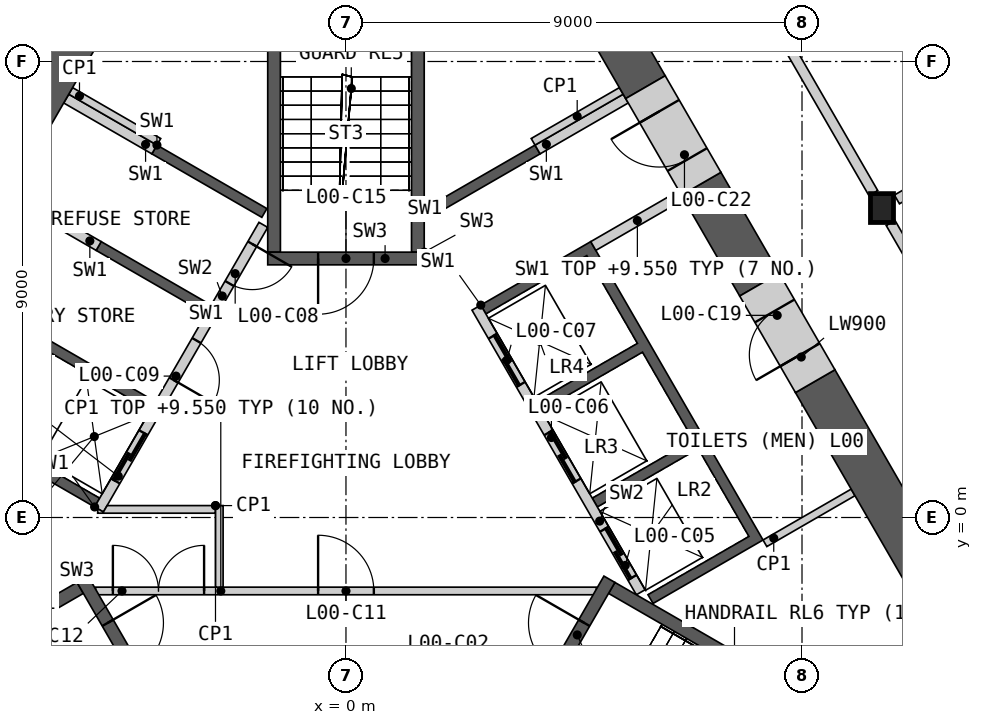
"""IFC4 building model, lengths in metres.
Left out: names, types, materials, properties, quantities, classifications, styles, units other than length and angle.
Written with IfcOpenShell. Run it as: python <this file> out.ifc"""

import sys

from ifc_helpers import new_model, si_unit, direction, frame, frame_2d, origin, origin_2d, place, context, subcontext, project, spatial, polyline, rectangle, i_section, outline, extrude, element, fill, save


model = new_model("IFC4")
c1 = context("Model", 3, precision=1e-05, world=origin(), true_north=direction((0.0, 1.0)))
c2 = subcontext(c1, "Body", "Model", "MODEL_VIEW")
j1 = project(units=[si_unit("LENGTHUNIT", "METRE"), si_unit("PLANEANGLEUNIT", "RADIAN")], contexts=[c1])
p1 = place(None, origin())
s1 = spatial("IfcSite", under=j1, at=p1, CompositionType="ELEMENT")
p2 = place(p1, origin())
s2 = spatial("IfcBuilding", under=s1, at=p2, CompositionType="ELEMENT")
p3 = place(p2, origin())
s3 = spatial("IfcBuildingStorey", under=s2, at=p3, CompositionType="ELEMENT", Elevation=0.0)
p4 = place(p3, frame((10.578, 6.107, 0.0), z_axis=(0.0, 0.0, 1.0), x_axis=(1.0, 0.0, 0.0)))
e1 = element("IfcColumn", 1, at=p4, inside=s3, PredefinedType="COLUMN", context=c2, shape_type="SweptSolid", body=[
    extrude(i_section(OverallWidth=0.454, OverallDepth=0.57, WebThickness=0.078, FlangeThickness=0.125, at=origin_2d()), origin(), (0.0, 0.0, 1.0), 10.0),
])
p5 = place(p3, origin())
e2 = element("IfcWall", 2, at=p5, inside=s3, PredefinedType="SHEAR", context=c2, shape_type="SweptSolid", body=[
    extrude(outline(polyline([(1.561, 6.097), (3.731, 7.35), (3.831, 7.177), (1.66, 5.924), (1.561, 6.097)])), origin(), (0.0, 0.0, 1.0), 9.55),
])
p6 = place(p3, origin())
e3 = element("IfcWall", 3, at=p6, inside=s3, PredefinedType="SHEAR", context=c2, shape_type="SweptSolid", body=[
    extrude(outline(polyline([(2.66, 4.192), (4.831, 5.445), (8.231, -0.444), (6.061, -1.697), (5.96, -1.524), (7.952, -0.374), (6.952, 1.358), (4.96, 0.208), (4.861, 0.381), (6.852, 1.531), (5.852, 3.263), (3.861, 2.113), (3.76, 2.287), (5.752, 3.437), (4.752, 5.169), (2.76, 4.019), (2.66, 4.192)])), origin(), (0.0, 0.0, 1.0), 9.55),
])
p7 = place(p3, frame((5.817, -1.476, 0.0), z_axis=(0.0, 0.0, 1.0), x_axis=(-0.499992876559, 0.866029516466, 0.0)))
e4 = element("IfcWall", 4, at=p7, inside=s3, PredefinedType="SOLIDWALL", context=c2, shape_type="SweptSolid", body=[
    extrude(rectangle(XDim=6.486, YDim=0.2, at=frame_2d((3.243, 0.0))), origin(), (0.0, 0.0, 1.0), 9.55),
])
p8 = place(p7, frame((0.337, 0.0, 0.0)))
e5 = element("IfcOpeningElement", 5, at=p8, cuts=e4, PredefinedType="OPENING", context=c2, shape_type="SweptSolid", body=[
    extrude(rectangle(XDim=1.1, YDim=2.1, at=frame_2d((0.55, 1.05))), frame((0.0, 0.11, 0.0), z_axis=(0.0, -1.0, 0.0), x_axis=(1.0, 0.0, 0.0)), (0.0, 0.0, 1.0), 0.22),
])
p9 = place(p7, frame((2.537, 0.0, 0.0)))
e6 = element("IfcOpeningElement", 6, at=p9, cuts=e4, PredefinedType="OPENING", context=c2, shape_type="SweptSolid", body=[
    extrude(rectangle(XDim=1.1, YDim=2.1, at=frame_2d((0.55, 1.05))), frame((0.0, 0.11, 0.0), z_axis=(0.0, -1.0, 0.0), x_axis=(1.0, 0.0, 0.0)), (0.0, 0.0, 1.0), 0.22),
])
p10 = place(p7, frame((4.737, 0.0, 0.0)))
e7 = element("IfcOpeningElement", 7, at=p10, cuts=e4, PredefinedType="OPENING", context=c2, shape_type="SweptSolid", body=[
    extrude(rectangle(XDim=1.1, YDim=2.1, at=frame_2d((0.55, 1.05))), frame((0.0, 0.11, 0.0), z_axis=(0.0, -1.0, 0.0), x_axis=(1.0, 0.0, 0.0)), (0.0, 0.0, 1.0), 0.22),
])
p11 = place(p3, frame((4.881, 5.358, 0.0), z_axis=(0.0, 0.0, 1.0), x_axis=(0.866035824272, 0.499981950752, 0.0)))
e8 = element("IfcWall", 8, at=p11, inside=s3, PredefinedType="SHEAR", context=c2, shape_type="SweptSolid", body=[
    extrude(rectangle(XDim=2.009, YDim=0.2, at=frame_2d((1.004, 0.0))), origin(), (0.0, 0.0, 1.0), 9.55),
])
p12 = place(p3, frame((3.781, 7.263, 0.0), z_axis=(0.0, 0.0, 1.0), x_axis=(0.865983199114, 0.50007309351, 0.0)))
e9 = element("IfcWall", 9, at=p12, inside=s3, PredefinedType="SHEAR", context=c2, shape_type="SweptSolid", body=[
    extrude(rectangle(XDim=2.009, YDim=0.2, at=frame_2d((1.004, 0.0))), origin(), (0.0, 0.0, 1.0), 9.55),
])
p13 = place(p3, origin())
e10 = element("IfcWall", 10, at=p13, inside=s3, PredefinedType="SHEAR", context=c2, shape_type="SweptSolid", body=[
    extrude(outline(polyline([(-4.96, 0.208), (-7.131, 1.461), (-5.931, 3.54), (-3.76, 2.287), (-3.861, 2.113), (-5.852, 3.263), (-6.852, 1.531), (-4.861, 0.381), (-4.96, 0.208)])), origin(), (0.0, 0.0, 1.0), 9.55),
])
p14 = place(p3, origin())
e11 = element("IfcWall", 11, at=p14, inside=s3, PredefinedType="SHEAR", context=c2, shape_type="SweptSolid", body=[
    extrude(outline(polyline([(-2.76, 4.019), (-4.931, 5.272), (-4.831, 5.445), (-2.66, 4.192), (-2.76, 4.019)])), origin(), (0.0, 0.0, 1.0), 9.55),
])
p15 = place(p3, origin())
e12 = element("IfcWall", 12, at=p15, inside=s3, PredefinedType="SHEAR", context=c2, shape_type="SweptSolid", body=[
    extrude(outline(polyline([(-3.731, 7.35), (-1.561, 6.097), (-1.66, 5.924), (-3.831, 7.177), (-3.731, 7.35)])), origin(), (0.0, 0.0, 1.0), 9.55),
])
p16 = place(p3, frame((-1.631, 5.776, 0.0), z_axis=(0.0, 0.0, 1.0), x_axis=(-0.499992876559, -0.866029516466, 0.0)))
e13 = element("IfcWall", 13, at=p16, inside=s3, PredefinedType="SOLIDWALL", context=c2, shape_type="SweptSolid", body=[
    extrude(rectangle(XDim=6.486, YDim=0.2, at=frame_2d((3.243, 0.0))), origin(), (0.0, 0.0, 1.0), 9.55),
])
p17 = place(p16, frame((0.437, 0.0, 0.0)))
e14 = element("IfcOpeningElement", 14, at=p17, cuts=e13, PredefinedType="OPENING", context=c2, shape_type="SweptSolid", body=[
    extrude(rectangle(XDim=0.9, YDim=2.1, at=frame_2d((0.45, 1.05))), frame((0.0, 0.11, 0.0), z_axis=(0.0, -1.0, 0.0), x_axis=(1.0, 0.0, 0.0)), (0.0, 0.0, 1.0), 0.22),
])
p18 = place(p16, frame((2.637, 0.0, 0.0)))
e15 = element("IfcOpeningElement", 15, at=p18, cuts=e13, PredefinedType="OPENING", context=c2, shape_type="SweptSolid", body=[
    extrude(rectangle(XDim=0.9, YDim=2.1, at=frame_2d((0.45, 1.05))), frame((0.0, 0.11, 0.0), z_axis=(0.0, -1.0, 0.0), x_axis=(1.0, 0.0, 0.0)), (0.0, 0.0, 1.0), 0.22),
])
p19 = place(p16, frame((4.737, 0.0, 0.0)))
e16 = element("IfcOpeningElement", 16, at=p19, cuts=e13, PredefinedType="OPENING", context=c2, shape_type="SweptSolid", body=[
    extrude(rectangle(XDim=1.1, YDim=2.1, at=frame_2d((0.55, 1.05))), frame((0.0, 0.11, 0.0), z_axis=(0.0, -1.0, 0.0), x_axis=(1.0, 0.0, 0.0)), (0.0, 0.0, 1.0), 0.22),
])
p20 = place(p3, frame((-3.781, 7.263, 0.0), z_axis=(0.0, 0.0, 1.0), x_axis=(-0.865983199114, 0.50007309351, 0.0)))
e17 = element("IfcWall", 17, at=p20, inside=s3, PredefinedType="SHEAR", context=c2, shape_type="SweptSolid", body=[
    extrude(rectangle(XDim=2.009, YDim=0.2, at=frame_2d((1.004, 0.0))), origin(), (0.0, 0.0, 1.0), 9.55),
])
p21 = place(p3, frame((-4.881, 5.358, 0.0), z_axis=(0.0, 0.0, 1.0), x_axis=(-0.866035824272, 0.499981950752, 0.0)))
e18 = element("IfcWall", 18, at=p21, inside=s3, PredefinedType="SHEAR", context=c2, shape_type="SweptSolid", body=[
    extrude(rectangle(XDim=2.009, YDim=0.2, at=frame_2d((1.004, 0.0))), origin(), (0.0, 0.0, 1.0), 9.55),
])
p22 = place(p3, frame((-4.941, -1.45, 0.0), z_axis=(0.0, 0.0, 1.0), x_axis=(1.0, 0.0, 0.0)))
e19 = element("IfcWall", 19, at=p22, inside=s3, PredefinedType="PARTITIONING", context=c2, shape_type="SweptSolid", body=[
    extrude(rectangle(XDim=9.882, YDim=0.15, at=frame_2d((4.941, 0.0))), origin(), (0.0, 0.0, 1.0), 9.55),
])
p23 = place(p22, frame((4.391, 0.0, 0.0)))
e20 = element("IfcOpeningElement", 20, at=p23, cuts=e19, PredefinedType="OPENING", context=c2, shape_type="SweptSolid", body=[
    extrude(rectangle(XDim=1.1, YDim=2.1, at=frame_2d((0.55, 1.05))), frame((0.0, 0.085, 0.0), z_axis=(0.0, -1.0, 0.0), x_axis=(1.0, 0.0, 0.0)), (0.0, 0.0, 1.0), 0.17),
])
p24 = place(p22, frame((0.341, 0.0, 0.0)))
e21 = element("IfcOpeningElement", 21, at=p24, cuts=e19, PredefinedType="OPENING", context=c2, shape_type="SweptSolid", body=[
    extrude(rectangle(XDim=1.8, YDim=2.1, at=frame_2d((0.9, 1.05))), frame((0.0, 0.085, 0.0), z_axis=(0.0, -1.0, 0.0), x_axis=(1.0, 0.0, 0.0)), (0.0, 0.0, 1.0), 0.17),
])
p25 = place(p3, origin())
e22 = element("IfcWall", 22, at=p25, inside=s3, PredefinedType="PARTITIONING", context=c2, shape_type="SweptSolid", body=[
    extrude(outline(polyline([(-2.575, 0.235), (-2.575, 0.085), (-4.9, 0.085), (-4.9, 0.173), (-4.787, 0.108), (-4.714, 0.235), (-2.575, 0.235)])), origin(), (0.0, 0.0, 1.0), 9.55),
])
p26 = place(p3, origin())
e23 = element("IfcWall", 23, at=p26, inside=s3, PredefinedType="PARTITIONING", context=c2, shape_type="SweptSolid", body=[
    extrude(outline(polyline([(-2.575, 0.235), (-2.425, 0.235), (-2.425, -1.375), (-2.575, -1.375), (-2.575, 0.235)])), origin(), (0.0, 0.0, 1.0), 9.55),
])
p27 = place(p3, origin())
e24 = element("IfcWall", 24, at=p27, inside=s3, PredefinedType="SHEAR", context=c2, shape_type="SweptSolid", body=[
    extrude(outline(polyline([(-5.307, -1.281), (-10.374, -4.206), (-10.032, -4.298), (-5.182, -1.498), (-5.307, -1.281)])), origin(), (0.0, 0.0, 1.0), 9.55),
])
p28 = place(p3, frame((-5.199, -1.219, 0.0), z_axis=(0.0, 0.0, 1.0), x_axis=(0.499982516597, -0.866035497597, 0.0)))
e25 = element("IfcWall", 25, at=p28, inside=s3, PredefinedType="SHEAR", context=c2, shape_type="SweptSolid", body=[
    extrude(rectangle(XDim=3.088, YDim=0.25, at=frame_2d((1.544, 0.0))), origin(), (0.0, 0.0, 1.0), 9.55),
])
p29 = place(p28, frame((0.994, 0.0, 0.0)))
e26 = element("IfcOpeningElement", 26, at=p29, cuts=e25, PredefinedType="OPENING", context=c2, shape_type="SweptSolid", body=[
    extrude(rectangle(XDim=1.1, YDim=2.1, at=frame_2d((0.55, 1.05))), frame((0.0, 0.135, 0.0), z_axis=(0.0, -1.0, 0.0), x_axis=(1.0, 0.0, 0.0)), (0.0, 0.0, 1.0), 0.27),
])
p30 = place(p3, origin())
e27 = element("IfcWall", 27, at=p30, inside=s3, PredefinedType="SHEAR", context=c2, shape_type="SweptSolid", body=[
    extrude(outline(polyline([(10.032, -4.298), (10.374, -4.206), (5.307, -1.281), (5.182, -1.498), (10.032, -4.298)])), origin(), (0.0, 0.0, 1.0), 9.55),
])
p31 = place(p3, frame((3.655, -3.893, 0.0), z_axis=(0.0, 0.0, 1.0), x_axis=(0.499982516597, 0.866035497597, 0.0)))
e28 = element("IfcWall", 28, at=p31, inside=s3, PredefinedType="SHEAR", context=c2, shape_type="SweptSolid", body=[
    extrude(rectangle(XDim=3.088, YDim=0.25, at=frame_2d((1.544, 0.0))), origin(), (0.0, 0.0, 1.0), 9.55),
])
p32 = place(p31, frame((0.994, 0.0, 0.0)))
e29 = element("IfcOpeningElement", 29, at=p32, cuts=e28, PredefinedType="OPENING", context=c2, shape_type="SweptSolid", body=[
    extrude(rectangle(XDim=1.1, YDim=2.1, at=frame_2d((0.55, 1.05))), frame((0.0, 0.135, 0.0), z_axis=(0.0, -1.0, 0.0), x_axis=(1.0, 0.0, 0.0)), (0.0, 0.0, 1.0), 0.27),
])
p33 = place(p3, origin())
e30 = element("IfcWall", 30, at=p33, inside=s3, PredefinedType="SHEAR", context=c2, shape_type="SweptSolid", body=[
    extrude(outline(polyline([(1.544, 5.237), (1.544, 11.087), (1.294, 10.837), (1.294, 5.237), (1.544, 5.237)])), origin(), (0.0, 0.0, 1.0), 9.55),
])
p34 = place(p3, origin())
e31 = element("IfcWall", 31, at=p34, inside=s3, PredefinedType="SHEAR", context=c2, shape_type="SweptSolid", body=[
    extrude(outline(polyline([(-1.294, 10.837), (-1.544, 11.087), (-1.544, 5.237), (-1.294, 5.237), (-1.294, 10.837)])), origin(), (0.0, 0.0, 1.0), 9.55),
])
p35 = place(p3, frame((1.544, 5.112, 0.0), z_axis=(0.0, 0.0, 1.0), x_axis=(-1.0, 0.0, 0.0)))
e32 = element("IfcWall", 32, at=p35, inside=s3, PredefinedType="SHEAR", context=c2, shape_type="SweptSolid", body=[
    extrude(rectangle(XDim=3.088, YDim=0.25, at=frame_2d((1.544, 0.0))), origin(), (0.0, 0.0, 1.0), 9.55),
])
p36 = place(p35, frame((0.994, 0.0, 0.0)))
e33 = element("IfcOpeningElement", 33, at=p36, cuts=e32, PredefinedType="OPENING", context=c2, shape_type="SweptSolid", body=[
    extrude(rectangle(XDim=1.1, YDim=2.1, at=frame_2d((0.55, 1.05))), frame((0.0, 0.135, 0.0), z_axis=(0.0, -1.0, 0.0), x_axis=(1.0, 0.0, 0.0)), (0.0, 0.0, 1.0), 0.27),
])
for number, where, z_axis, x_axis in (
    (34, (3.693, 7.415, 0.0), (0.0, 0.0, 1.0), (0.866, 0.5, 0.0)),
    (35, (8.268, -0.509, 0.0), (0.0, 0.0, 1.0), (0.866, 0.5, 0.0)),
    (36, (-3.693, 7.415, 0.0), (0.0, 0.0, 1.0), (-0.866, 0.5, 0.0)),
):
    element("IfcWall", number, at=place(p3, frame(where, z_axis=z_axis, x_axis=x_axis)), inside=s3, PredefinedType="PARTITIONING", context=c2, shape_type="SweptSolid", body=[
        extrude(rectangle(XDim=2.009, YDim=0.15, at=frame_2d((1.004, 0.0))), origin(), (0.0, 0.0, 1.0), 9.55),
    ])
p37 = place(p3, frame((5.91, 8.493, 0.0), z_axis=(0.0, 0.0, 1.0), x_axis=(-0.50000828114, 0.866020622613, 0.0)))
e37 = element("IfcWall", 37, at=p37, inside=s3, PredefinedType="SHEAR", context=c2, shape_type="SweptSolid", body=[
    extrude(rectangle(XDim=11.041, YDim=0.9, at=frame_2d((5.521, 0.0))), origin(), (0.0, 0.0, 1.0), 9.55),
])
p38 = place(p3, frame((12.583, -3.065, 0.0), z_axis=(0.0, 0.0, 1.0), x_axis=(-0.49998745675, 0.866032645512, 0.0)))
e38 = element("IfcWall", 38, at=p38, inside=s3, PredefinedType="SHEAR", context=c2, shape_type="SweptSolid", body=[
    extrude(rectangle(XDim=6.646, YDim=0.9, at=frame_2d((3.323, 0.0))), origin(), (0.0, 0.0, 1.0), 9.55),
])
p39 = place(p3, frame((8.16, 4.596, 0.0), z_axis=(0.0, 0.0, 1.0), x_axis=(-0.500077740698, 0.865980515519, 0.0)))
e39 = element("IfcWall", 39, at=p39, inside=s3, PredefinedType="SHEAR", context=c2, shape_type="SweptSolid", body=[
    extrude(rectangle(XDim=2.3, YDim=0.9, at=frame_2d((1.15, 0.0))), origin(), (0.0, 0.0, 1.0), 9.55),
])
p40 = place(p3, frame((-3.637, 12.43, 0.0), z_axis=(0.0, 0.0, 1.0), x_axis=(-0.500011513458, -0.866018756384, 0.0)))
e40 = element("IfcWall", 40, at=p40, inside=s3, PredefinedType="SHEAR", context=c2, shape_type="SweptSolid", body=[
    extrude(rectangle(XDim=9.066, YDim=0.9, at=frame_2d((4.533, 0.0))), origin(), (0.0, 0.0, 1.0), 9.55),
])
p41 = place(p3, frame((9.26, 2.691, 0.0), z_axis=(0.0, 0.0, 1.0), x_axis=(-0.499946605688, 0.86605622881, 0.0)))
e41 = element("IfcWall", 41, at=p41, inside=s3, PredefinedType="SHEAR", context=c2, shape_type="SweptSolid", body=[
    extrude(rectangle(XDim=2.2, YDim=0.9, at=frame_2d((1.1, 0.0))), origin(), (0.0, 0.0, 1.0), 9.55),
])
p42 = place(p41, frame((0.6, 0.0, 0.0)))
e42 = element("IfcOpeningElement", 42, at=p42, cuts=e41, PredefinedType="OPENING", context=c2, shape_type="SweptSolid", body=[
    extrude(rectangle(XDim=1.0, YDim=2.1, at=frame_2d((0.5, 1.05))), frame((0.0, 0.46, 0.0), z_axis=(0.0, -1.0, 0.0), x_axis=(1.0, 0.0, 0.0)), (0.0, 0.0, 1.0), 0.92),
])
p43 = place(p3, frame((7.01, 6.588, 0.0), z_axis=(0.0, 0.0, 1.0), x_axis=(-0.499946605688, 0.86605622881, 0.0)))
e43 = element("IfcWall", 43, at=p43, inside=s3, PredefinedType="SHEAR", context=c2, shape_type="SweptSolid", body=[
    extrude(rectangle(XDim=2.2, YDim=0.9, at=frame_2d((1.1, 0.0))), origin(), (0.0, 0.0, 1.0), 9.55),
])
p44 = place(p43, frame((0.55, 0.0, 0.0)))
e44 = element("IfcOpeningElement", 44, at=p44, cuts=e43, PredefinedType="OPENING", context=c2, shape_type="SweptSolid", body=[
    extrude(rectangle(XDim=1.1, YDim=2.1, at=frame_2d((0.55, 1.05))), frame((0.0, 0.46, 0.0), z_axis=(0.0, -1.0, 0.0), x_axis=(1.0, 0.0, 0.0)), (0.0, 0.0, 1.0), 0.92),
])
p45 = place(p3, frame((10.749, 5.813, 0.0), z_axis=(0.0, 0.0, 1.0), x_axis=(0.500004292778, -0.866022925334, 0.0)))
e45 = element("IfcWall", 45, at=p45, inside=s3, PredefinedType="PARTITIONING", context=c2, shape_type="SweptSolid", body=[
    extrude(rectangle(XDim=9.898, YDim=0.2, at=frame_2d((4.949, 0.0))), origin(), (0.0, 0.0, 1.0), 9.55),
])
p46 = place(p45, frame((3.898, 0.0, 0.0)))
e46 = element("IfcOpeningElement", 46, at=p46, cuts=e45, PredefinedType="OPENING", context=c2, shape_type="SweptSolid", body=[
    extrude(rectangle(XDim=2.0, YDim=2.1, at=frame_2d((1.0, 1.05))), frame((0.0, 0.11, 0.0), z_axis=(0.0, -1.0, 0.0), x_axis=(1.0, 0.0, 0.0)), (0.0, 0.0, 1.0), 0.22),
])
p47 = place(p3, frame((5.459, 14.974, 0.0), z_axis=(0.0, 0.0, 1.0), x_axis=(0.499985793049, -0.866033606016, 0.0)))
e47 = element("IfcWall", 47, at=p47, inside=s3, PredefinedType="PARTITIONING", context=c2, shape_type="SweptSolid", body=[
    extrude(rectangle(XDim=9.898, YDim=0.2, at=frame_2d((4.949, 0.0))), origin(), (0.0, 0.0, 1.0), 9.55),
])
p48 = place(p47, frame((3.898, 0.0, 0.0)))
e48 = element("IfcOpeningElement", 48, at=p48, cuts=e47, PredefinedType="OPENING", context=c2, shape_type="SweptSolid", body=[
    extrude(rectangle(XDim=2.0, YDim=2.1, at=frame_2d((1.0, 1.05))), frame((0.0, 0.11, 0.0), z_axis=(0.0, -1.0, 0.0), x_axis=(1.0, 0.0, 0.0)), (0.0, 0.0, 1.0), 0.22),
])
p49 = place(p3, frame((-10.408, 6.402, 0.0), z_axis=(0.0, 0.0, 1.0), x_axis=(0.499985793049, 0.866033606016, 0.0)))
e49 = element("IfcWall", 49, at=p49, inside=s3, PredefinedType="PARTITIONING", context=c2, shape_type="SweptSolid", body=[
    extrude(rectangle(XDim=9.898, YDim=0.2, at=frame_2d((4.949, 0.0))), origin(), (0.0, 0.0, 1.0), 9.55),
])
p50 = place(p49, frame((1.869, 0.0, 0.0)))
e50 = element("IfcOpeningElement", 50, at=p50, cuts=e49, PredefinedType="OPENING", context=c2, shape_type="SweptSolid", body=[
    extrude(rectangle(XDim=1.0, YDim=2.1, at=frame_2d((0.5, 1.05))), frame((0.0, 0.11, 0.0), z_axis=(0.0, -1.0, 0.0), x_axis=(1.0, 0.0, 0.0)), (0.0, 0.0, 1.0), 0.22),
])
p51 = place(p3, frame((10.873, 6.278, 0.0), z_axis=(0.0, 0.0, 1.0), x_axis=(0.866021920282, 0.500006033555, 0.0)))
e51 = element("IfcWall", 51, at=p51, inside=s3, PredefinedType="PARTITIONING", context=c2, shape_type="SweptSolid", body=[
    extrude(rectangle(XDim=9.961, YDim=0.2, at=frame_2d((4.981, 0.0))), origin(), (0.0, 0.0, 1.0), 9.55),
])
p52 = place(p8, origin())
e52 = element("IfcDoor", 52, at=p52, inside=s3, OperationType="SLIDING_TO_LEFT", PredefinedType="DOOR", context=c2, shape_type="SweptSolid", body=[
    extrude(rectangle(XDim=1.1, YDim=2.1, at=frame_2d((0.55, 1.05))), frame((0.0, 0.025, 0.0), z_axis=(0.0, -1.0, 0.0), x_axis=(1.0, 0.0, 0.0)), (0.0, 0.0, 1.0), 0.05),
])
fill(e5, e52)
p53 = place(p9, origin())
e53 = element("IfcDoor", 53, at=p53, inside=s3, OperationType="SLIDING_TO_LEFT", PredefinedType="DOOR", context=c2, shape_type="SweptSolid", body=[
    extrude(rectangle(XDim=1.1, YDim=2.1, at=frame_2d((0.55, 1.05))), frame((0.0, 0.025, 0.0), z_axis=(0.0, -1.0, 0.0), x_axis=(1.0, 0.0, 0.0)), (0.0, 0.0, 1.0), 0.05),
])
fill(e6, e53)
p54 = place(p10, origin())
e54 = element("IfcDoor", 54, at=p54, inside=s3, OperationType="SLIDING_TO_LEFT", PredefinedType="DOOR", context=c2, shape_type="SweptSolid", body=[
    extrude(rectangle(XDim=1.1, YDim=2.1, at=frame_2d((0.55, 1.05))), frame((0.0, 0.025, 0.0), z_axis=(0.0, -1.0, 0.0), x_axis=(1.0, 0.0, 0.0)), (0.0, 0.0, 1.0), 0.05),
])
fill(e7, e54)
p55 = place(p17, origin())
e55 = element("IfcDoor", 55, at=p55, inside=s3, OperationType="SINGLE_SWING_LEFT", PredefinedType="DOOR", context=c2, shape_type="SweptSolid", body=[
    extrude(rectangle(XDim=0.9, YDim=2.1, at=frame_2d((0.45, 1.05))), frame((0.0, 0.025, 0.0), z_axis=(0.0, -1.0, 0.0), x_axis=(1.0, 0.0, 0.0)), (0.0, 0.0, 1.0), 0.05),
])
fill(e14, e55)
p56 = place(p18, origin())
e56 = element("IfcDoor", 56, at=p56, inside=s3, OperationType="SINGLE_SWING_RIGHT", PredefinedType="DOOR", context=c2, shape_type="SweptSolid", body=[
    extrude(rectangle(XDim=0.9, YDim=2.1, at=frame_2d((0.45, 1.05))), frame((0.0, 0.025, 0.0), z_axis=(0.0, -1.0, 0.0), x_axis=(1.0, 0.0, 0.0)), (0.0, 0.0, 1.0), 0.05),
])
fill(e15, e56)
p57 = place(p19, origin())
e57 = element("IfcDoor", 57, at=p57, inside=s3, OperationType="SLIDING_TO_LEFT", PredefinedType="DOOR", context=c2, shape_type="SweptSolid", body=[
    extrude(rectangle(XDim=1.1, YDim=2.1, at=frame_2d((0.55, 1.05))), frame((0.0, 0.025, 0.0), z_axis=(0.0, -1.0, 0.0), x_axis=(1.0, 0.0, 0.0)), (0.0, 0.0, 1.0), 0.05),
])
fill(e16, e57)
p58 = place(p23, origin())
e58 = element("IfcDoor", 58, at=p58, inside=s3, OperationType="SINGLE_SWING_LEFT", PredefinedType="DOOR", context=c2, shape_type="SweptSolid", body=[
    extrude(rectangle(XDim=1.1, YDim=2.1, at=frame_2d((0.55, 1.05))), frame((0.0, 0.025, 0.0), z_axis=(0.0, -1.0, 0.0), x_axis=(1.0, 0.0, 0.0)), (0.0, 0.0, 1.0), 0.05),
])
fill(e20, e58)
p59 = place(p24, origin())
e59 = element("IfcDoor", 59, at=p59, inside=s3, OperationType="DOUBLE_DOOR_SINGLE_SWING", PredefinedType="DOOR", context=c2, shape_type="SweptSolid", body=[
    extrude(rectangle(XDim=1.8, YDim=2.1, at=frame_2d((0.9, 1.05))), frame((0.0, 0.025, 0.0), z_axis=(0.0, -1.0, 0.0), x_axis=(1.0, 0.0, 0.0)), (0.0, 0.0, 1.0), 0.05),
])
fill(e21, e59)
p60 = place(p29, origin())
e60 = element("IfcDoor", 60, at=p60, inside=s3, OperationType="SINGLE_SWING_LEFT", PredefinedType="DOOR", context=c2, shape_type="SweptSolid", body=[
    extrude(rectangle(XDim=1.1, YDim=2.1, at=frame_2d((0.55, 1.05))), frame((0.0, 0.025, 0.0), z_axis=(0.0, -1.0, 0.0), x_axis=(1.0, 0.0, 0.0)), (0.0, 0.0, 1.0), 0.05),
])
fill(e26, e60)
p61 = place(p32, origin())
e61 = element("IfcDoor", 61, at=p61, inside=s3, OperationType="SINGLE_SWING_RIGHT", PredefinedType="DOOR", context=c2, shape_type="SweptSolid", body=[
    extrude(rectangle(XDim=1.1, YDim=2.1, at=frame_2d((0.55, 1.05))), frame((0.0, 0.025, 0.0), z_axis=(0.0, -1.0, 0.0), x_axis=(1.0, 0.0, 0.0)), (0.0, 0.0, 1.0), 0.05),
])
fill(e29, e61)
p62 = place(p36, origin())
e62 = element("IfcDoor", 62, at=p62, inside=s3, OperationType="SINGLE_SWING_RIGHT", PredefinedType="DOOR", context=c2, shape_type="SweptSolid", body=[
    extrude(rectangle(XDim=1.1, YDim=2.1, at=frame_2d((0.55, 1.05))), frame((0.0, 0.025, 0.0), z_axis=(0.0, -1.0, 0.0), x_axis=(1.0, 0.0, 0.0)), (0.0, 0.0, 1.0), 0.05),
])
fill(e33, e62)
p63 = place(p42, origin())
e63 = element("IfcDoor", 63, at=p63, inside=s3, OperationType="SINGLE_SWING_LEFT", PredefinedType="DOOR", context=c2, shape_type="SweptSolid", body=[
    extrude(rectangle(XDim=1.0, YDim=2.1, at=frame_2d((0.5, 1.05))), frame((0.0, 0.205, 0.0), z_axis=(0.0, -1.0, 0.0), x_axis=(1.0, 0.0, 0.0)), (0.0, 0.0, 1.0), 0.05),
])
fill(e42, e63)
p64 = place(p44, origin())
e64 = element("IfcDoor", 64, at=p64, inside=s3, OperationType="SINGLE_SWING_RIGHT", PredefinedType="DOOR", context=c2, shape_type="SweptSolid", body=[
    extrude(rectangle(XDim=1.1, YDim=2.1, at=frame_2d((0.55, 1.05))), frame((0.0, 0.205, 0.0), z_axis=(0.0, -1.0, 0.0), x_axis=(1.0, 0.0, 0.0)), (0.0, 0.0, 1.0), 0.05),
])
fill(e44, e64)
save(model, sys.argv[1])
